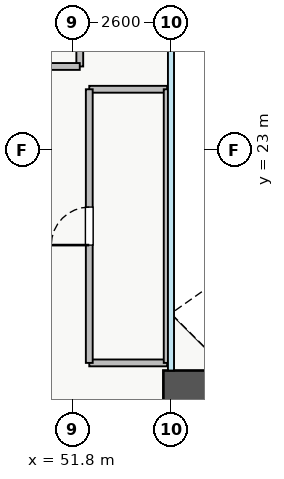
"""IFC4 building model, lengths in metres.
Left out: names, types, materials, properties, quantities, classifications, styles, units other than length and angle.
Written with IfcOpenShell. Run it as: python <this file> out.ifc"""

import sys

from ifc_helpers import new_model, si_unit, direction, frame, frame_2d, origin, place, context, subcontext, project, spatial, rectangle, extrude, source, transform, mapped, element, fill, save


model = new_model("IFC4")
c1 = context("Model", 3, precision=1e-05, world=origin(), true_north=direction((0.0, 1.0)))
c2 = subcontext(c1, "Body", "Model", "MODEL_VIEW")
j1 = project(units=[si_unit("LENGTHUNIT", "METRE"), si_unit("PLANEANGLEUNIT", "RADIAN")], contexts=[c1])
p1 = place(None, origin())
s1 = spatial("IfcSite", under=j1, at=p1, CompositionType="ELEMENT")
p2 = place(p1, origin())
s2 = spatial("IfcBuilding", under=s1, at=p2, CompositionType="ELEMENT")
p3 = place(p2, frame((0.0, 0.0, 5.0)))
s3 = spatial("IfcBuildingStorey", under=s2, at=p3, CompositionType="ELEMENT", Elevation=5.0)
p4 = place(p3, frame((54.2, 16.8, 0.0), z_axis=(0.0, 0.0, 1.0), x_axis=(1.0, 0.0, 0.0)))
e1 = element("IfcWall", 1, at=p4, inside=s3, PredefinedType="SHEAR", context=c2, shape_type="SweptSolid", body=[
    extrude(rectangle(XDim=12.6, YDim=0.8, at=frame_2d((6.3, 0.0))), origin(), (0.0, 0.0, 1.0), 4.4),
])
p5 = place(p3, frame((52.0, 25.2, 0.0), z_axis=(0.0, 0.0, 1.0), x_axis=(0.0, 1.0, 0.0)))
e2 = element("IfcWall", 2, at=p5, inside=s3, PredefinedType="PARTITIONING", context=c2, shape_type="SweptSolid", body=[
    extrude(rectangle(XDim=10.6, YDim=0.18, at=frame_2d((5.3, 0.0))), origin(), (0.0, 0.0, 1.0), 4.18),
])
p6 = place(p5, frame((1.375, 0.0, 0.0)))
e3 = element("IfcOpeningElement", 3, at=p6, cuts=e2, PredefinedType="OPENING", context=c2, shape_type="SweptSolid", body=[
    extrude(rectangle(XDim=0.85, YDim=2.05, at=frame_2d((0.425, 1.025))), frame((0.0, 0.1, 0.0), z_axis=(0.0, -1.0, 0.0), x_axis=(1.0, 0.0, 0.0)), (0.0, 0.0, 1.0), 0.2),
])
p7 = place(p5, frame((4.98, 0.0, 0.0)))
e4 = element("IfcOpeningElement", 4, at=p7, cuts=e2, PredefinedType="OPENING", context=c2, shape_type="SweptSolid", body=[
    extrude(rectangle(XDim=0.85, YDim=2.05, at=frame_2d((0.425, 1.025))), frame((0.0, 0.1, 0.0), z_axis=(0.0, -1.0, 0.0), x_axis=(1.0, 0.0, 0.0)), (0.0, 0.0, 1.0), 0.2),
])
p8 = place(p5, frame((8.48, 0.0, 0.0)))
e5 = element("IfcOpeningElement", 5, at=p8, cuts=e2, PredefinedType="OPENING", context=c2, shape_type="SweptSolid", body=[
    extrude(rectangle(XDim=0.85, YDim=2.05, at=frame_2d((0.425, 1.025))), frame((0.0, 0.1, 0.0), z_axis=(0.0, -1.0, 0.0), x_axis=(1.0, 0.0, 0.0)), (0.0, 0.0, 1.0), 0.2),
])
p9 = place(p3, frame((46.8, 25.2, 0.0), z_axis=(0.0, 0.0, 1.0), x_axis=(1.0, 0.0, 0.0)))
e6 = element("IfcWall", 6, at=p9, inside=s3, PredefinedType="PARTITIONING", context=c2, shape_type="SweptSolid", body=[
    extrude(rectangle(XDim=5.2, YDim=0.18, at=frame_2d((2.6, 0.0))), origin(), (0.0, 0.0, 1.0), 4.18),
])
for number, where, z_axis, x_axis in (
    (7, (52.25, 17.4, 0.0), (0.0, 0.0, 1.0), (1.0, 0.0, 0.0)),
    (8, (52.25, 24.6, 0.0), (0.0, 0.0, 1.0), (1.0, 0.0, 0.0)),
):
    element("IfcWall", number, at=place(p3, frame(where, z_axis=z_axis, x_axis=x_axis)), inside=s3, PredefinedType="PARTITIONING", context=c2, shape_type="SweptSolid", body=[
        extrude(rectangle(XDim=2.05, YDim=0.18, at=frame_2d((1.025, 0.0))), origin(), (0.0, 0.0, 1.0), 4.18),
    ])
p10 = place(p3, frame((52.25, 17.4, 0.0), z_axis=(0.0, 0.0, 1.0), x_axis=(0.0, 1.0, 0.0)))
e9 = element("IfcWall", 9, at=p10, inside=s3, PredefinedType="PARTITIONING", context=c2, shape_type="SweptSolid", body=[
    extrude(rectangle(XDim=7.2, YDim=0.18, at=frame_2d((3.6, 0.0))), origin(), (0.0, 0.0, 1.0), 4.18),
])
p11 = place(p10, frame((3.1, 0.0, 0.0)))
e10 = element("IfcOpeningElement", 10, at=p11, cuts=e9, PredefinedType="OPENING", context=c2, shape_type="SweptSolid", body=[
    extrude(rectangle(XDim=1.0, YDim=2.05, at=frame_2d((0.5, 1.025))), frame((0.0, 0.1, 0.0), z_axis=(0.0, -1.0, 0.0), x_axis=(1.0, 0.0, 0.0)), (0.0, 0.0, 1.0), 0.2),
])
p12 = place(p3, frame((54.3, 17.4, 0.0), z_axis=(0.0, 0.0, 1.0), x_axis=(0.0, 1.0, 0.0)))
e11 = element("IfcWall", 11, at=p12, inside=s3, PredefinedType="PARTITIONING", context=c2, shape_type="SweptSolid", body=[
    extrude(rectangle(XDim=7.2, YDim=0.18, at=frame_2d((3.6, 0.0))), origin(), (0.0, 0.0, 1.0), 4.18),
])
m1 = source(origin(), c2, "Body", "SweptSolid", [
    extrude(rectangle(XDim=1.0, YDim=2.05, at=frame_2d((0.5, 1.025))), frame((0.0, 0.025, 0.0), z_axis=(0.0, -1.0, 0.0), x_axis=(1.0, 0.0, 0.0)), (0.0, 0.0, 1.0), 0.05),
])
p13 = place(p11, origin())
e12 = element("IfcDoor", 12, at=p13, inside=s3, OperationType="SINGLE_SWING_LEFT", PredefinedType="DOOR", context=c2, shape_type="MappedRepresentation", body=[
    mapped(m1, transform((0.0, 0.0, 0.0), x_axis=(1.0, 0.0, 0.0), y_axis=(0.0, 1.0, 0.0), z_axis=(0.0, 0.0, 1.0), scale=1.0)),
])
fill(e10, e12)
save(model, sys.argv[1])
